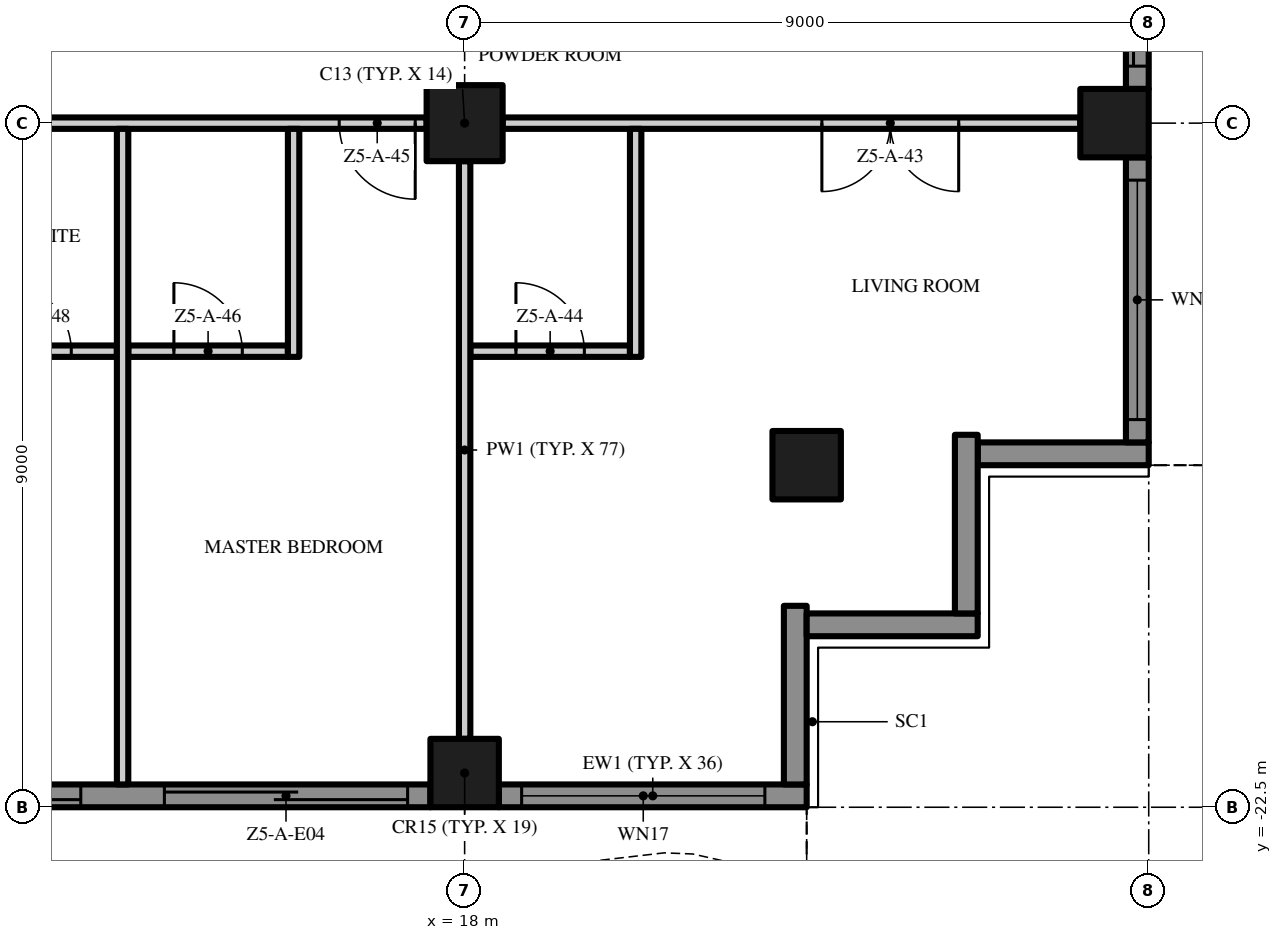
"""IFC4 building model, lengths in metres.
Left out: names, types, materials, properties, quantities, classifications, styles, units other than length and angle.
Written with IfcOpenShell. Run it as: python <this file> out.ifc"""

import sys

from ifc_helpers import new_model, si_unit, direction, frame, frame_2d, origin, origin_2d, place, context, subcontext, project, spatial, polyline, rectangle, outline, extrude, element, fill, save


model = new_model("IFC4")
c1 = context("Model", 3, precision=1e-05, world=origin(), true_north=direction((0.0, 1.0)))
c2 = subcontext(c1, "Body", "Model", "MODEL_VIEW")
j1 = project(units=[si_unit("LENGTHUNIT", "METRE"), si_unit("PLANEANGLEUNIT", "RADIAN")], contexts=[c1])
p1 = place(None, origin())
s1 = spatial("IfcSite", under=j1, at=p1, CompositionType="ELEMENT")
p2 = place(p1, origin())
s2 = spatial("IfcBuilding", under=s1, at=p2, CompositionType="ELEMENT")
p3 = place(p2, frame((0.0, 0.0, 238.8)))
s3 = spatial("IfcBuildingStorey", under=s2, at=p3, CompositionType="ELEMENT", Elevation=238.8)
p4 = place(p3, frame((18.0, -13.5, 0.0), z_axis=(0.0, 0.0, 1.0), x_axis=(1.0, 0.0, 0.0)))
e1 = element("IfcColumn", 1, at=p4, inside=s3, PredefinedType="COLUMN", context=c2, shape_type="SweptSolid", body=[
    extrude(rectangle(XDim=1.0, YDim=1.0, at=origin_2d()), origin(), (0.0, 0.0, 1.0), 3.5),
])
for number, where, z_axis, x_axis in (
    (2, (18.0, -22.05, 0.0), (0.0, 0.0, 1.0), (1.0, 0.0, 0.0)),
    (3, (26.55, -13.5, 0.0), (0.0, 0.0, 1.0), (1.0, 0.0, 0.0)),
    (4, (22.5, -18.0, 0.0), (0.0, 0.0, 1.0), (1.0, 0.0, 0.0)),
):
    element("IfcColumn", number, at=place(p3, frame(where, z_axis=z_axis, x_axis=x_axis)), inside=s3, PredefinedType="COLUMN", context=c2, shape_type="SweptSolid", body=[
        extrude(rectangle(XDim=0.9, YDim=0.9, at=origin_2d()), origin(), (0.0, 0.0, 1.0), 3.5),
    ])
p5 = place(p3, frame((17.55, -22.35, 0.0), z_axis=(0.0, 0.0, 1.0), x_axis=(-1.0, 0.0, 0.0)))
e5 = element("IfcWall", 5, at=p5, inside=s3, PredefinedType="SOLIDWALL", context=c2, shape_type="SweptSolid", body=[
    extrude(rectangle(XDim=8.1, YDim=0.3, at=frame_2d((4.05, 0.0))), origin(), (0.0, 0.0, 1.0), 3.5),
])
p6 = place(p5, frame((4.6, 0.0, 0.0)))
e6 = element("IfcOpeningElement", 6, at=p6, cuts=e5, PredefinedType="OPENING", context=c2, shape_type="SweptSolid", body=[
    extrude(rectangle(XDim=3.2, YDim=2.4, at=frame_2d((1.6, 1.2))), frame((0.0, 0.16, 0.0), z_axis=(0.0, -1.0, 0.0), x_axis=(1.0, 0.0, 0.0)), (0.0, 0.0, 1.0), 0.32),
])
p7 = place(p5, frame((0.3, 0.0, 0.0)))
e7 = element("IfcOpeningElement", 7, at=p7, cuts=e5, PredefinedType="OPENING", context=c2, shape_type="SweptSolid", body=[
    extrude(rectangle(XDim=3.2, YDim=2.4, at=frame_2d((1.6, 1.2))), frame((0.0, 0.16, 0.0), z_axis=(0.0, -1.0, 0.0), x_axis=(1.0, 0.0, 0.0)), (0.0, 0.0, 1.0), 0.32),
])
p8 = place(p3, frame((22.5, -22.35, 0.0), z_axis=(0.0, 0.0, 1.0), x_axis=(-1.0, 0.0, 0.0)))
e8 = element("IfcWall", 8, at=p8, inside=s3, PredefinedType="SOLIDWALL", context=c2, shape_type="SweptSolid", body=[
    extrude(rectangle(XDim=4.05, YDim=0.3, at=frame_2d((2.025, 0.0))), origin(), (0.0, 0.0, 1.0), 3.5),
])
p9 = place(p8, frame((0.55, 0.0, 0.45)))
e9 = element("IfcOpeningElement", 9, at=p9, cuts=e8, PredefinedType="OPENING", context=c2, shape_type="SweptSolid", body=[
    extrude(rectangle(XDim=3.2, YDim=2.65, at=frame_2d((1.6, 1.325))), frame((0.0, 0.16, 0.0), z_axis=(0.0, -1.0, 0.0), x_axis=(1.0, 0.0, 0.0)), (0.0, 0.0, 1.0), 0.32),
])
p10 = place(p3, frame((22.35, -19.85, 0.0), z_axis=(0.0, 0.0, 1.0), x_axis=(0.0, -1.0, 0.0)))
e10 = element("IfcWall", 10, at=p10, inside=s3, PredefinedType="SOLIDWALL", context=c2, shape_type="SweptSolid", body=[
    extrude(rectangle(XDim=2.35, YDim=0.3, at=frame_2d((1.175, 0.0))), origin(), (0.0, 0.0, 1.0), 3.5),
])
p11 = place(p3, frame((24.75, -20.1, 0.0), z_axis=(0.0, 0.0, 1.0), x_axis=(-1.0, 0.0, 0.0)))
e11 = element("IfcWall", 11, at=p11, inside=s3, PredefinedType="SOLIDWALL", context=c2, shape_type="SweptSolid", body=[
    extrude(rectangle(XDim=2.25, YDim=0.3, at=frame_2d((1.125, 0.0))), origin(), (0.0, 0.0, 1.0), 3.5),
])
p12 = place(p3, frame((24.6, -17.6, 0.0), z_axis=(0.0, 0.0, 1.0), x_axis=(0.0, -1.0, 0.0)))
e12 = element("IfcWall", 12, at=p12, inside=s3, PredefinedType="SOLIDWALL", context=c2, shape_type="SweptSolid", body=[
    extrude(rectangle(XDim=2.35, YDim=0.3, at=frame_2d((1.175, 0.0))), origin(), (0.0, 0.0, 1.0), 3.5),
])
p13 = place(p3, frame((27.0, -17.85, 0.0), z_axis=(0.0, 0.0, 1.0), x_axis=(-1.0, 0.0, 0.0)))
e13 = element("IfcWall", 13, at=p13, inside=s3, PredefinedType="SOLIDWALL", context=c2, shape_type="SweptSolid", body=[
    extrude(rectangle(XDim=2.25, YDim=0.3, at=frame_2d((1.125, 0.0))), origin(), (0.0, 0.0, 1.0), 3.5),
])
p14 = place(p3, frame((26.85, -13.95, 0.0), z_axis=(0.0, 0.0, 1.0), x_axis=(0.0, -1.0, 0.0)))
e14 = element("IfcWall", 14, at=p14, inside=s3, PredefinedType="SOLIDWALL", context=c2, shape_type="SweptSolid", body=[
    extrude(rectangle(XDim=3.75, YDim=0.3, at=frame_2d((1.875, 0.0))), origin(), (0.0, 0.0, 1.0), 3.5),
])
p15 = place(p14, frame((0.3, 0.0, 0.45)))
e15 = element("IfcOpeningElement", 15, at=p15, cuts=e14, PredefinedType="OPENING", context=c2, shape_type="SweptSolid", body=[
    extrude(rectangle(XDim=3.15, YDim=2.65, at=frame_2d((1.575, 1.325))), frame((0.0, 0.16, 0.0), z_axis=(0.0, -1.0, 0.0), x_axis=(1.0, 0.0, 0.0)), (0.0, 0.0, 1.0), 0.32),
])
p16 = place(p3, frame((26.85, -4.95, 0.0), z_axis=(0.0, 0.0, 1.0), x_axis=(0.0, -1.0, 0.0)))
e16 = element("IfcWall", 16, at=p16, inside=s3, PredefinedType="SOLIDWALL", context=c2, shape_type="SweptSolid", body=[
    extrude(rectangle(XDim=8.1, YDim=0.3, at=frame_2d((4.05, 0.0))), origin(), (0.0, 0.0, 1.0), 3.5),
])
p17 = place(p16, frame((4.6, 0.0, 0.0)))
e17 = element("IfcOpeningElement", 17, at=p17, cuts=e16, PredefinedType="OPENING", context=c2, shape_type="SweptSolid", body=[
    extrude(rectangle(XDim=3.2, YDim=2.4, at=frame_2d((1.6, 1.2))), frame((0.0, 0.16, 0.0), z_axis=(0.0, -1.0, 0.0), x_axis=(1.0, 0.0, 0.0)), (0.0, 0.0, 1.0), 0.32),
])
p18 = place(p16, frame((0.3, 0.0, 0.45)))
e18 = element("IfcOpeningElement", 18, at=p18, cuts=e16, PredefinedType="OPENING", context=c2, shape_type="SweptSolid", body=[
    extrude(rectangle(XDim=3.2, YDim=2.65, at=frame_2d((1.6, 1.325))), frame((0.0, 0.16, 0.0), z_axis=(0.0, -1.0, 0.0), x_axis=(1.0, 0.0, 0.0)), (0.0, 0.0, 1.0), 0.32),
])
p19 = place(p3, origin())
e19 = element("IfcWall", 19, at=p19, inside=s3, PredefinedType="USERDEFINED", context=c2, shape_type="SweptSolid", body=[
    extrude(outline(polyline([(-22.5, -23.451), (-21.0, -24.112), (-19.5, -24.845), (-18.0, -25.369), (-16.875, -25.5), (-16.5, -25.485), (-15.0, -25.149), (-13.5, -24.488), (-12.0, -23.755), (-10.5, -23.231), (-9.375, -23.1), (-9.0, -23.115), (-7.5, -23.451), (-6.0, -24.112), (-4.5, -24.845), (-3.0, -25.369), (-1.875, -25.5), (-1.5, -25.485), (0.0, -25.149), (1.5, -24.488), (3.0, -23.755), (4.5, -23.231), (5.625, -23.1), (6.0, -23.115), (7.5, -23.451), (9.0, -24.112), (10.5, -24.845), (12.0, -25.369), (13.125, -25.5), (13.5, -25.485), (15.0, -25.149), (16.5, -24.488), (18.0, -23.755), (19.5, -23.231), (20.625, -23.1), (21.0, -23.115), (22.5, -23.451), (22.555, -23.208), (21.033, -22.866), (20.615, -22.849), (19.444, -22.986), (17.904, -23.524), (16.395, -24.261), (14.921, -24.91), (13.467, -25.236), (13.135, -25.249), (12.056, -25.124), (10.596, -24.614), (9.105, -23.885), (7.579, -23.213), (6.033, -22.866), (5.615, -22.849), (4.444, -22.986), (2.904, -23.524), (1.395, -24.261), (-0.079, -24.91), (-1.533, -25.236), (-1.865, -25.249), (-2.944, -25.124), (-4.404, -24.614), (-5.895, -23.885), (-7.421, -23.213), (-8.967, -22.866), (-9.385, -22.849), (-10.556, -22.986), (-12.096, -23.524), (-13.605, -24.261), (-15.079, -24.91), (-16.533, -25.236), (-16.865, -25.249), (-17.944, -25.124), (-19.404, -24.614), (-20.895, -23.885), (-22.399, -23.223), (-22.5, -23.451)])), origin(), (0.0, 0.0, 1.0), 0.9),
])
p20 = place(p3, origin())
e20 = element("IfcWall", 20, at=p20, inside=s3, PredefinedType="USERDEFINED", context=c2, shape_type="SweptSolid", body=[
    extrude(outline(polyline([(27.951, -18.0), (28.612, -16.5), (29.345, -15.0), (29.869, -13.5), (30.0, -12.375), (29.985, -12.0), (29.649, -10.5), (28.988, -9.0), (28.255, -7.5), (27.731, -6.0), (27.6, -4.875), (27.615, -4.5), (27.951, -3.0), (28.612, -1.5), (29.345, 0.0), (29.869, 1.5), (30.0, 2.625), (29.985, 3.0), (29.649, 4.5), (28.988, 6.0), (28.255, 7.5), (27.731, 9.0), (27.6, 10.125), (27.615, 10.5), (27.951, 12.0), (28.612, 13.5), (29.345, 15.0), (29.869, 16.5), (30.0, 17.625), (29.985, 18.0), (29.735, 17.99), (29.749, 17.635), (29.624, 16.556), (29.114, 15.096), (28.385, 13.605), (27.713, 12.079), (27.366, 10.533), (27.349, 10.115), (27.486, 8.944), (28.024, 7.404), (28.761, 5.895), (29.41, 4.421), (29.736, 2.967), (29.749, 2.635), (29.624, 1.556), (29.114, 0.096), (28.385, -1.395), (27.713, -2.921), (27.366, -4.467), (27.349, -4.885), (27.486, -6.056), (28.024, -7.596), (28.761, -9.105), (29.41, -10.579), (29.736, -12.033), (29.749, -12.365), (29.624, -13.444), (29.114, -14.904), (28.385, -16.395), (27.723, -17.899), (27.951, -18.0)])), origin(), (0.0, 0.0, 1.0), 0.9),
])
p21 = place(p3, frame((11.325, -16.5, 0.0), z_axis=(0.0, 0.0, 1.0), x_axis=(1.0, 0.0, 0.0)))
e21 = element("IfcWall", 21, at=p21, inside=s3, PredefinedType="PARTITIONING", context=c2, shape_type="SweptSolid", body=[
    extrude(rectangle(XDim=2.1, YDim=0.15, at=frame_2d((1.05, 0.0))), origin(), (0.0, 0.0, 1.0), 3.5),
])
p22 = place(p21, frame((0.6, 0.0, 0.0)))
e22 = element("IfcOpeningElement", 22, at=p22, cuts=e21, PredefinedType="OPENING", context=c2, shape_type="SweptSolid", body=[
    extrude(rectangle(XDim=0.9, YDim=2.1, at=frame_2d((0.45, 1.05))), frame((0.0, 0.085, 0.0), z_axis=(0.0, -1.0, 0.0), x_axis=(1.0, 0.0, 0.0)), (0.0, 0.0, 1.0), 0.17),
])
p23 = place(p3, frame((13.575, -16.5, 0.0), z_axis=(0.0, 0.0, 1.0), x_axis=(1.0, 0.0, 0.0)))
e23 = element("IfcWall", 23, at=p23, inside=s3, PredefinedType="PARTITIONING", context=c2, shape_type="SweptSolid", body=[
    extrude(rectangle(XDim=2.1, YDim=0.15, at=frame_2d((1.05, 0.0))), origin(), (0.0, 0.0, 1.0), 3.5),
])
p24 = place(p23, frame((0.6, 0.0, 0.0)))
e24 = element("IfcOpeningElement", 24, at=p24, cuts=e23, PredefinedType="OPENING", context=c2, shape_type="SweptSolid", body=[
    extrude(rectangle(XDim=0.9, YDim=2.1, at=frame_2d((0.45, 1.05))), frame((0.0, 0.085, 0.0), z_axis=(0.0, -1.0, 0.0), x_axis=(1.0, 0.0, 0.0)), (0.0, 0.0, 1.0), 0.17),
])
p25 = place(p3, frame((18.075, -16.5, 0.0), z_axis=(0.0, 0.0, 1.0), x_axis=(1.0, 0.0, 0.0)))
e25 = element("IfcWall", 25, at=p25, inside=s3, PredefinedType="PARTITIONING", context=c2, shape_type="SweptSolid", body=[
    extrude(rectangle(XDim=2.1, YDim=0.15, at=frame_2d((1.05, 0.0))), origin(), (0.0, 0.0, 1.0), 3.5),
])
p26 = place(p25, frame((0.6, 0.0, 0.0)))
e26 = element("IfcOpeningElement", 26, at=p26, cuts=e25, PredefinedType="OPENING", context=c2, shape_type="SweptSolid", body=[
    extrude(rectangle(XDim=0.9, YDim=2.1, at=frame_2d((0.45, 1.05))), frame((0.0, 0.085, 0.0), z_axis=(0.0, -1.0, 0.0), x_axis=(1.0, 0.0, 0.0)), (0.0, 0.0, 1.0), 0.17),
])
p27 = place(p3, frame((17.5, -13.5, 0.0), z_axis=(0.0, 0.0, 1.0), x_axis=(-1.0, 0.0, 0.0)))
e27 = element("IfcWall", 27, at=p27, inside=s3, PredefinedType="PARTITIONING", context=c2, shape_type="SweptSolid", body=[
    extrude(rectangle(XDim=8.0, YDim=0.15, at=frame_2d((4.0, 0.0))), origin(), (0.0, 0.0, 1.0), 3.5),
])
p28 = place(p27, frame((0.15, 0.0, 0.0)))
e28 = element("IfcOpeningElement", 28, at=p28, cuts=e27, PredefinedType="OPENING", context=c2, shape_type="SweptSolid", body=[
    extrude(rectangle(XDim=1.0, YDim=2.4, at=frame_2d((0.5, 1.2))), frame((0.0, 0.085, 0.0), z_axis=(0.0, -1.0, 0.0), x_axis=(1.0, 0.0, 0.0)), (0.0, 0.0, 1.0), 0.17),
])
p29 = place(p27, frame((6.85, 0.0, 0.0)))
e29 = element("IfcOpeningElement", 29, at=p29, cuts=e27, PredefinedType="OPENING", context=c2, shape_type="SweptSolid", body=[
    extrude(rectangle(XDim=1.0, YDim=2.4, at=frame_2d((0.5, 1.2))), frame((0.0, 0.085, 0.0), z_axis=(0.0, -1.0, 0.0), x_axis=(1.0, 0.0, 0.0)), (0.0, 0.0, 1.0), 0.17),
])
p30 = place(p3, frame((26.1, -13.5, 0.0), z_axis=(0.0, 0.0, 1.0), x_axis=(-1.0, 0.0, 0.0)))
e30 = element("IfcWall", 30, at=p30, inside=s3, PredefinedType="PARTITIONING", context=c2, shape_type="SweptSolid", body=[
    extrude(rectangle(XDim=7.6, YDim=0.15, at=frame_2d((3.8, 0.0))), origin(), (0.0, 0.0, 1.0), 3.5),
])
p31 = place(p30, frame((1.6, 0.0, 0.0)))
e31 = element("IfcOpeningElement", 31, at=p31, cuts=e30, PredefinedType="OPENING", context=c2, shape_type="SweptSolid", body=[
    extrude(rectangle(XDim=1.8, YDim=2.4, at=frame_2d((0.9, 1.2))), frame((0.0, 0.085, 0.0), z_axis=(0.0, -1.0, 0.0), x_axis=(1.0, 0.0, 0.0)), (0.0, 0.0, 1.0), 0.17),
])
p32 = place(p3, frame((13.5, -22.2, 0.0), z_axis=(0.0, 0.0, 1.0), x_axis=(0.0, 1.0, 0.0)))
e32 = element("IfcWall", 32, at=p32, inside=s3, PredefinedType="PARTITIONING", context=c2, shape_type="SweptSolid", body=[
    extrude(rectangle(XDim=8.625, YDim=0.15, at=frame_2d((4.312, 0.0))), origin(), (0.0, 0.0, 1.0), 3.5),
])
p33 = place(p3, frame((15.75, -16.575, 0.0), z_axis=(0.0, 0.0, 1.0), x_axis=(0.0, 1.0, 0.0)))
e33 = element("IfcWall", 33, at=p33, inside=s3, PredefinedType="PARTITIONING", context=c2, shape_type="SweptSolid", body=[
    extrude(rectangle(XDim=3.0, YDim=0.15, at=frame_2d((1.5, 0.0))), origin(), (0.0, 0.0, 1.0), 3.5),
])
p34 = place(p3, frame((18.0, -21.6, 0.0), z_axis=(0.0, 0.0, 1.0), x_axis=(0.0, 1.0, 0.0)))
e34 = element("IfcWall", 34, at=p34, inside=s3, PredefinedType="PARTITIONING", context=c2, shape_type="SweptSolid", body=[
    extrude(rectangle(XDim=7.6, YDim=0.15, at=frame_2d((3.8, 0.0))), origin(), (0.0, 0.0, 1.0), 3.5),
])
p35 = place(p3, frame((20.25, -16.575, 0.0), z_axis=(0.0, 0.0, 1.0), x_axis=(0.0, 1.0, 0.0)))
e35 = element("IfcWall", 35, at=p35, inside=s3, PredefinedType="PARTITIONING", context=c2, shape_type="SweptSolid", body=[
    extrude(rectangle(XDim=3.0, YDim=0.15, at=frame_2d((1.5, 0.0))), origin(), (0.0, 0.0, 1.0), 3.5),
])
p36 = place(p6, origin())
e36 = element("IfcDoor", 36, at=p36, inside=s3, OperationType="SINGLE_SWING_LEFT", PredefinedType="DOOR", context=c2, shape_type="SweptSolid", body=[
    extrude(rectangle(XDim=3.2, YDim=2.4, at=frame_2d((1.6, 1.2))), frame((0.0, 0.025, 0.0), z_axis=(0.0, -1.0, 0.0), x_axis=(1.0, 0.0, 0.0)), (0.0, 0.0, 1.0), 0.05),
])
fill(e6, e36)
p37 = place(p7, origin())
e37 = element("IfcDoor", 37, at=p37, inside=s3, OperationType="SINGLE_SWING_LEFT", PredefinedType="DOOR", context=c2, shape_type="SweptSolid", body=[
    extrude(rectangle(XDim=3.2, YDim=2.4, at=frame_2d((1.6, 1.2))), frame((0.0, 0.025, 0.0), z_axis=(0.0, -1.0, 0.0), x_axis=(1.0, 0.0, 0.0)), (0.0, 0.0, 1.0), 0.05),
])
fill(e7, e37)
p38 = place(p9, origin())
e38 = element("IfcWindow", 38, at=p38, inside=s3, PartitioningType="SINGLE_PANEL", PredefinedType="WINDOW", context=c2, shape_type="SweptSolid", body=[
    extrude(rectangle(XDim=3.2, YDim=2.65, at=frame_2d((1.6, 1.325))), frame((0.0, 0.03, 0.0), z_axis=(0.0, -1.0, 0.0), x_axis=(1.0, 0.0, 0.0)), (0.0, 0.0, 1.0), 0.06),
])
fill(e9, e38)
p39 = place(p15, origin())
e39 = element("IfcWindow", 39, at=p39, inside=s3, PartitioningType="SINGLE_PANEL", PredefinedType="WINDOW", context=c2, shape_type="SweptSolid", body=[
    extrude(rectangle(XDim=3.15, YDim=2.65, at=frame_2d((1.575, 1.325))), frame((0.0, 0.03, 0.0), z_axis=(0.0, -1.0, 0.0), x_axis=(1.0, 0.0, 0.0)), (0.0, 0.0, 1.0), 0.06),
])
fill(e15, e39)
p40 = place(p17, origin())
e40 = element("IfcDoor", 40, at=p40, inside=s3, OperationType="SINGLE_SWING_LEFT", PredefinedType="DOOR", context=c2, shape_type="SweptSolid", body=[
    extrude(rectangle(XDim=3.2, YDim=2.4, at=frame_2d((1.6, 1.2))), frame((0.0, 0.025, 0.0), z_axis=(0.0, -1.0, 0.0), x_axis=(1.0, 0.0, 0.0)), (0.0, 0.0, 1.0), 0.05),
])
fill(e17, e40)
p41 = place(p31, origin())
e41 = element("IfcDoor", 41, at=p41, inside=s3, OperationType="DOUBLE_DOOR_SINGLE_SWING", PredefinedType="DOOR", context=c2, shape_type="SweptSolid", body=[
    extrude(rectangle(XDim=1.8, YDim=2.4, at=frame_2d((0.9, 1.2))), frame((0.0, 0.025, 0.0), z_axis=(0.0, -1.0, 0.0), x_axis=(1.0, 0.0, 0.0)), (0.0, 0.0, 1.0), 0.05),
])
fill(e31, e41)
p42 = place(p26, origin())
e42 = element("IfcDoor", 42, at=p42, inside=s3, OperationType="SINGLE_SWING_LEFT", PredefinedType="DOOR", context=c2, shape_type="SweptSolid", body=[
    extrude(rectangle(XDim=0.9, YDim=2.1, at=frame_2d((0.45, 1.05))), frame((0.0, 0.025, 0.0), z_axis=(0.0, -1.0, 0.0), x_axis=(1.0, 0.0, 0.0)), (0.0, 0.0, 1.0), 0.05),
])
fill(e26, e42)
p43 = place(p28, origin())
e43 = element("IfcDoor", 43, at=p43, inside=s3, OperationType="SINGLE_SWING_LEFT", PredefinedType="DOOR", context=c2, shape_type="SweptSolid", body=[
    extrude(rectangle(XDim=1.0, YDim=2.4, at=frame_2d((0.5, 1.2))), frame((0.0, 0.025, 0.0), z_axis=(0.0, -1.0, 0.0), x_axis=(1.0, 0.0, 0.0)), (0.0, 0.0, 1.0), 0.05),
])
fill(e28, e43)
p44 = place(p24, origin())
e44 = element("IfcDoor", 44, at=p44, inside=s3, OperationType="SINGLE_SWING_LEFT", PredefinedType="DOOR", context=c2, shape_type="SweptSolid", body=[
    extrude(rectangle(XDim=0.9, YDim=2.1, at=frame_2d((0.45, 1.05))), frame((0.0, 0.025, 0.0), z_axis=(0.0, -1.0, 0.0), x_axis=(1.0, 0.0, 0.0)), (0.0, 0.0, 1.0), 0.05),
])
fill(e24, e44)
p45 = place(p22, origin())
e45 = element("IfcDoor", 45, at=p45, inside=s3, OperationType="SINGLE_SWING_LEFT", PredefinedType="DOOR", context=c2, shape_type="SweptSolid", body=[
    extrude(rectangle(XDim=0.9, YDim=2.1, at=frame_2d((0.45, 1.05))), frame((0.0, 0.025, 0.0), z_axis=(0.0, -1.0, 0.0), x_axis=(1.0, 0.0, 0.0)), (0.0, 0.0, 1.0), 0.05),
])
fill(e22, e45)
save(model, sys.argv[1])
